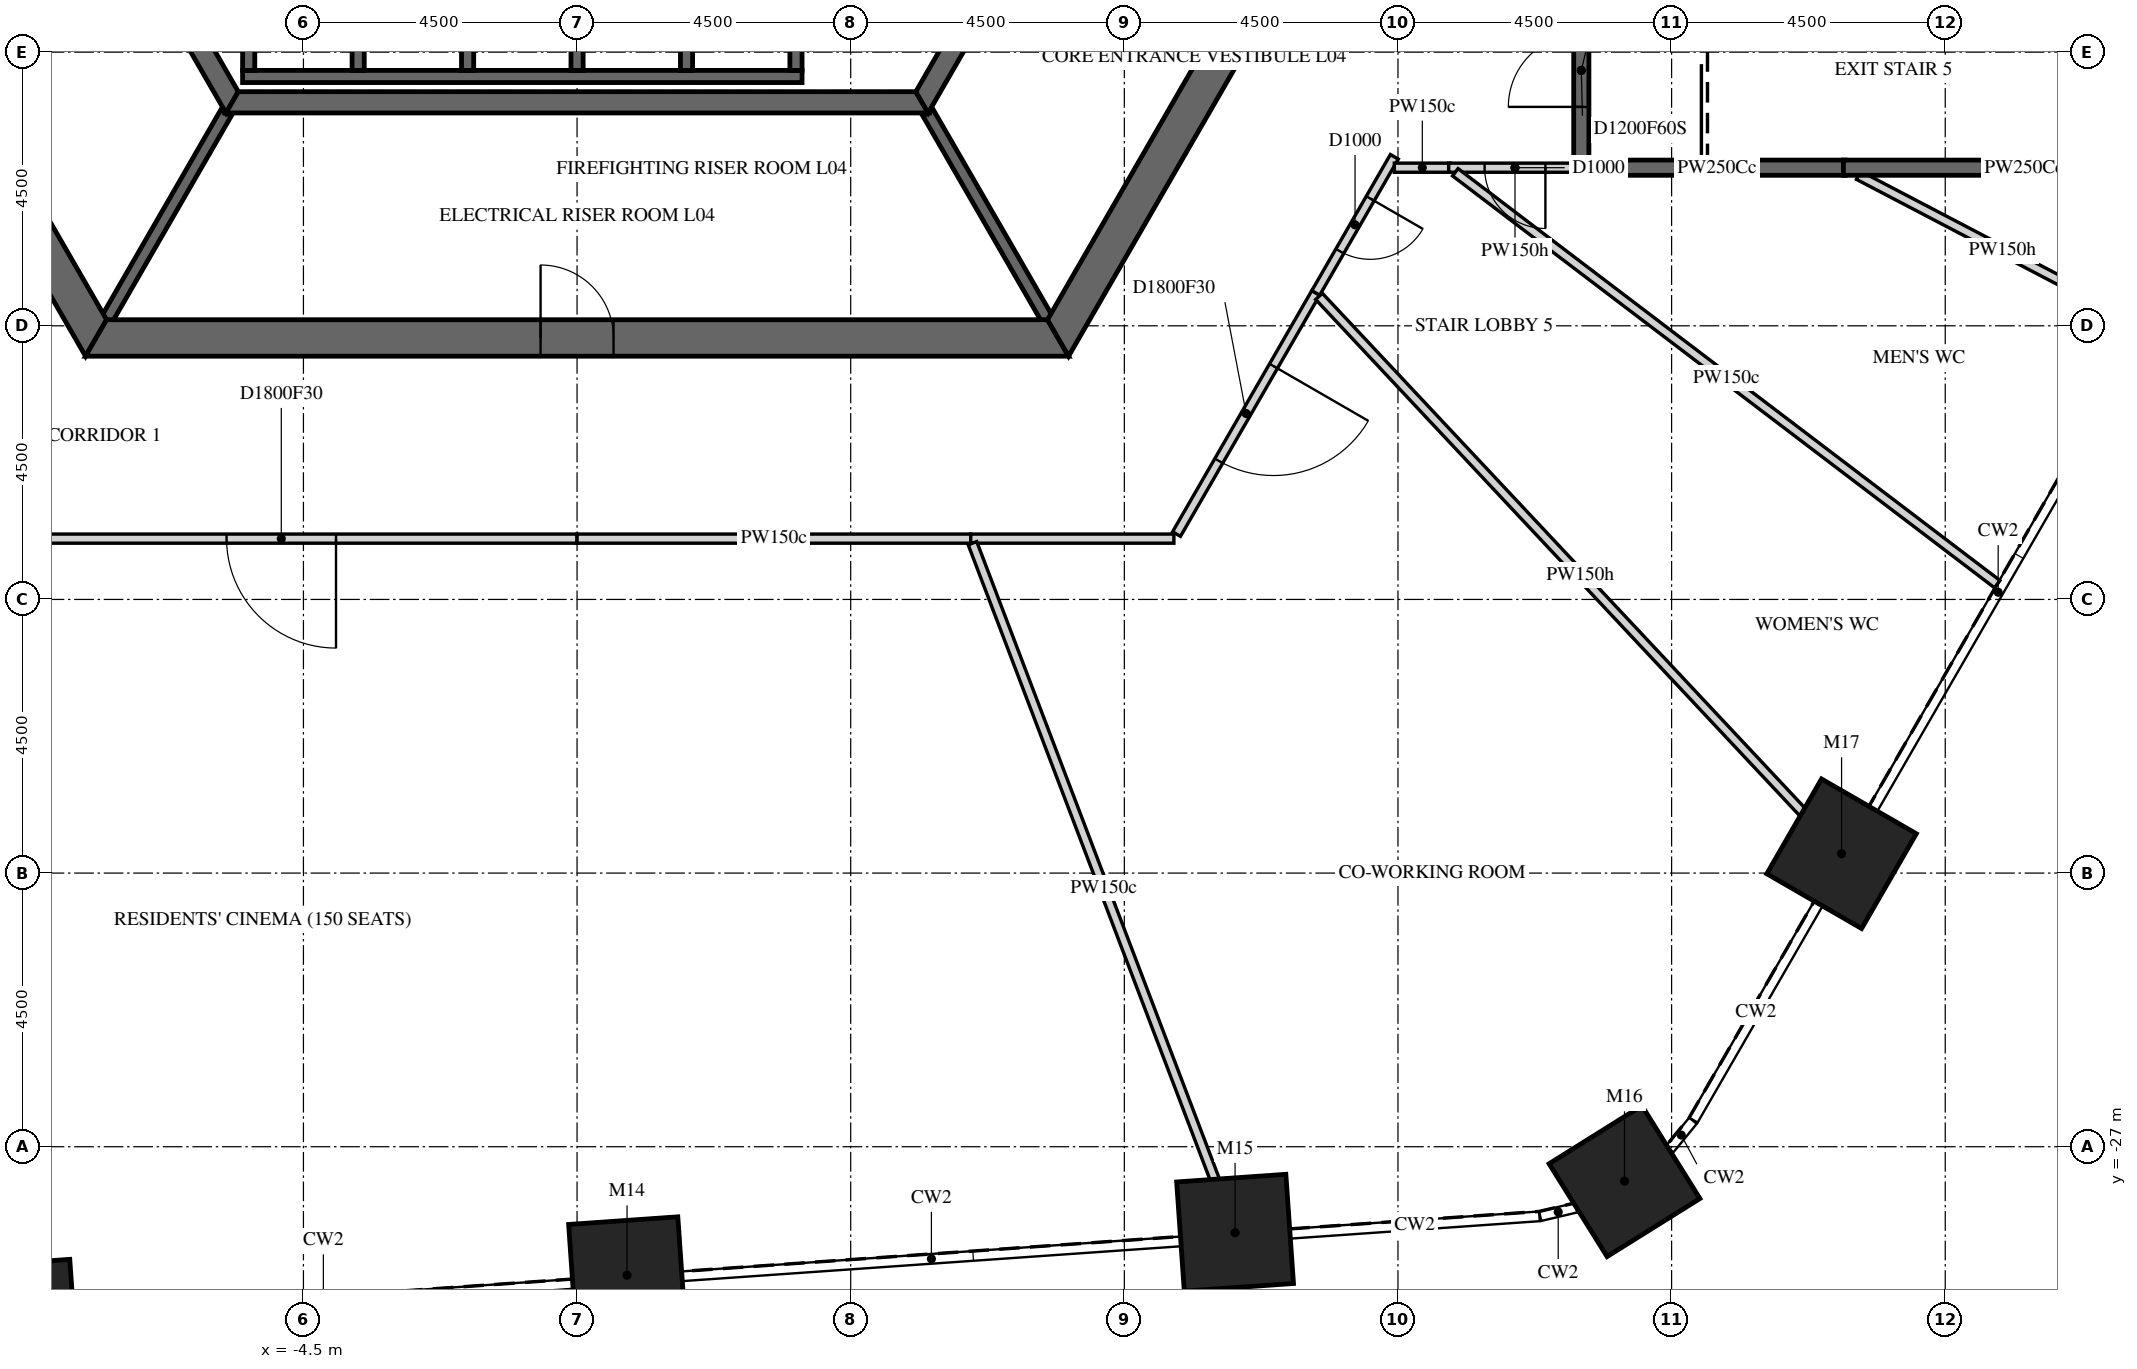
"""IFC4 building model, lengths in metres.
Left out: names, types, materials, properties, quantities, classifications, styles, units other than length and angle.
Written with IfcOpenShell. Run it as: python <this file> out.ifc"""

import sys

from ifc_helpers import new_model, si_unit, direction, frame, frame_2d, origin, origin_2d, place, context, subcontext, project, spatial, polyline, rectangle, outline, extrude, element, fill, save


model = new_model("IFC4")
c1 = context("Model", 3, precision=1e-05, world=origin(), true_north=direction((0.0, 1.0)))
c2 = subcontext(c1, "Body", "Model", "MODEL_VIEW")
j1 = project(units=[si_unit("LENGTHUNIT", "METRE"), si_unit("PLANEANGLEUNIT", "RADIAN")], contexts=[c1])
p1 = place(None, origin())
s1 = spatial("IfcSite", under=j1, at=p1, CompositionType="ELEMENT")
p2 = place(p1, origin())
s2 = spatial("IfcBuilding", under=s1, at=p2, CompositionType="ELEMENT")
p3 = place(p2, frame((0.0, 0.0, 26.0)))
s3 = spatial("IfcBuildingStorey", under=s2, at=p3, CompositionType="ELEMENT", Elevation=26.0)
for number, where, z_axis, x_axis in (
    (1, (-9.177, -29.813, -0.25), (0.0, 0.0, 1.0), (-0.998, -0.07, 0.0)),
    (2, (0.822, -29.114, -0.25), (0.0, 0.0, 1.0), (-0.998, -0.07, 0.0)),
    (3, (10.821, -28.414, -0.25), (0.0, 0.0, 1.0), (-0.998, -0.07, 0.0)),
    (4, (17.225, -27.566, -0.25), (0.0, 0.0, 1.0), (-0.848, -0.53, 0.0)),
    (5, (20.795, -22.182, -0.25), (0.0, 0.0, 1.0), (-0.5, -0.866, 0.0)),
):
    element("IfcColumn", number, at=place(p3, frame(where, z_axis=z_axis, x_axis=x_axis)), inside=s3, PredefinedType="COLUMN", context=c2, shape_type="SweptSolid", body=[
        extrude(rectangle(XDim=1.8, YDim=1.8, at=origin_2d()), origin(), (0.0, 0.0, 1.0), 5.45),
    ])
p4 = place(p3, frame((-15.819, 0.0, -0.25), z_axis=(0.0, 0.0, 1.0), x_axis=(0.499999880136, -0.866025472988, 0.0)))
e6 = element("IfcWall", 6, at=p4, inside=s3, PredefinedType="SHEAR", context=c2, shape_type="SweptSolid", body=[
    extrude(outline(polyline([(-0.173, -0.3), (15.993, -0.3), (15.646, 0.3), (0.173, 0.3), (-0.173, -0.3)])), origin(), (0.0, 0.0, 1.0), 5.45),
])
p5 = place(p4, frame((6.981, 0.0, 0.25)))
e7 = element("IfcOpeningElement", 7, at=p5, cuts=e6, PredefinedType="OPENING", context=c2, shape_type="SweptSolid", body=[
    extrude(rectangle(XDim=1.8, YDim=2.4, at=frame_2d((0.9, 1.2))), frame((0.0, 0.31, 0.0), z_axis=(0.0, -1.0, 0.0), x_axis=(1.0, 0.0, 0.0)), (0.0, 0.0, 1.0), 0.62),
])
p6 = place(p3, frame((-7.91, -13.7, -0.25), z_axis=(0.0, 0.0, 1.0), x_axis=(1.0, 0.0, 0.0)))
e8 = element("IfcWall", 8, at=p6, inside=s3, PredefinedType="SHEAR", context=c2, shape_type="SweptSolid", body=[
    extrude(outline(polyline([(-0.173, -0.3), (15.993, -0.3), (15.646, 0.3), (0.173, 0.3), (-0.173, -0.3)])), origin(), (0.0, 0.0, 1.0), 5.45),
])
p7 = place(p6, frame((7.31, 0.0, 0.25)))
e9 = element("IfcOpeningElement", 9, at=p7, cuts=e8, PredefinedType="OPENING", context=c2, shape_type="SweptSolid", body=[
    extrude(rectangle(XDim=1.2, YDim=2.4, at=frame_2d((0.6, 1.2))), frame((0.0, 0.31, 0.0), z_axis=(0.0, -1.0, 0.0), x_axis=(1.0, 0.0, 0.0)), (0.0, 0.0, 1.0), 0.62),
])
p8 = place(p3, frame((7.91, -13.7, -0.25), z_axis=(0.0, 0.0, 1.0), x_axis=(0.499999880136, 0.866025472988, 0.0)))
e10 = element("IfcWall", 10, at=p8, inside=s3, PredefinedType="SHEAR", context=c2, shape_type="SweptSolid", body=[
    extrude(outline(polyline([(-0.173, -0.3), (15.993, -0.3), (15.646, 0.3), (0.173, 0.3), (-0.173, -0.3)])), origin(), (0.0, 0.0, 1.0), 5.45),
])
p9 = place(p8, frame((7.039, 0.0, 0.25)))
e11 = element("IfcOpeningElement", 11, at=p9, cuts=e10, PredefinedType="OPENING", context=c2, shape_type="SweptSolid", body=[
    extrude(rectangle(XDim=1.8, YDim=2.4, at=frame_2d((0.9, 1.2))), frame((0.0, 0.31, 0.0), z_axis=(0.0, -1.0, 0.0), x_axis=(1.0, 0.0, 0.0)), (0.0, 0.0, 1.0), 0.62),
])
p10 = place(p3, frame((-11.345, 0.0, -0.25), z_axis=(0.0, 0.0, 1.0), x_axis=(0.499995046907, -0.866028263435, 0.0)))
e12 = element("IfcWall", 12, at=p10, inside=s3, PredefinedType="SHEAR", context=c2, shape_type="SweptSolid", body=[
    extrude(outline(polyline([(-0.101, -0.175), (11.446, -0.175), (11.244, 0.175), (0.101, 0.175), (-0.101, -0.175)])), origin(), (0.0, 0.0, 1.0), 5.45),
])
p11 = place(p10, frame((4.744, 0.0, 0.25)))
e13 = element("IfcOpeningElement", 13, at=p11, cuts=e12, PredefinedType="OPENING", context=c2, shape_type="SweptSolid", body=[
    extrude(rectangle(XDim=1.8, YDim=2.4, at=frame_2d((0.9, 1.2))), frame((0.0, 0.185, 0.0), z_axis=(0.0, -1.0, 0.0), x_axis=(1.0, 0.0, 0.0)), (0.0, 0.0, 1.0), 0.37),
])
p12 = place(p3, frame((-5.673, -9.825, -0.25), z_axis=(0.0, 0.0, 1.0), x_axis=(1.0, 0.0, 0.0)))
e14 = element("IfcWall", 14, at=p12, inside=s3, PredefinedType="SHEAR", context=c2, shape_type="SweptSolid", body=[
    extrude(outline(polyline([(-0.101, -0.175), (11.446, -0.175), (11.244, 0.175), (0.101, 0.175), (-0.101, -0.175)])), origin(), (0.0, 0.0, 1.0), 5.45),
])
p13 = place(p3, frame((5.673, -9.825, -0.25), z_axis=(0.0, 0.0, 1.0), x_axis=(0.499995046907, 0.866028263435, 0.0)))
e15 = element("IfcWall", 15, at=p13, inside=s3, PredefinedType="SHEAR", context=c2, shape_type="SweptSolid", body=[
    extrude(outline(polyline([(-0.101, -0.175), (11.446, -0.175), (11.244, 0.175), (0.101, 0.175), (-0.101, -0.175)])), origin(), (0.0, 0.0, 1.0), 5.45),
])
p14 = place(p13, frame((4.801, 0.0, 0.25)))
e16 = element("IfcOpeningElement", 16, at=p14, cuts=e15, PredefinedType="OPENING", context=c2, shape_type="SweptSolid", body=[
    extrude(rectangle(XDim=1.8, YDim=2.4, at=frame_2d((0.9, 1.2))), frame((0.0, 0.185, 0.0), z_axis=(0.0, -1.0, 0.0), x_axis=(1.0, 0.0, 0.0)), (0.0, 0.0, 1.0), 0.37),
])
p15 = place(p3, frame((-5.5, -9.4, -0.25), z_axis=(0.0, 0.0, 1.0), x_axis=(1.0, 0.0, 0.0)))
e17 = element("IfcWall", 17, at=p15, inside=s3, PredefinedType="SHEAR", context=c2, shape_type="SweptSolid", body=[
    extrude(rectangle(XDim=9.2, YDim=0.2, at=frame_2d((4.6, 0.0))), origin(), (0.0, 0.0, 1.0), 5.5),
])
for number, where, z_axis, x_axis in (
    (18, (-5.4, -9.3, -0.25), (0.0, 0.0, 1.0), (0.0, 1.0, 0.0)),
    (19, (-3.6, -9.3, -0.25), (0.0, 0.0, 1.0), (0.0, 1.0, 0.0)),
    (20, (-1.8, -9.3, -0.25), (0.0, 0.0, 1.0), (0.0, 1.0, 0.0)),
    (21, (0.0, -9.3, -0.25), (0.0, 0.0, 1.0), (0.0, 1.0, 0.0)),
    (22, (1.8, -9.3, -0.25), (0.0, 0.0, 1.0), (0.0, 1.0, 0.0)),
    (23, (3.6, -9.3, -0.25), (0.0, 0.0, 1.0), (0.0, 1.0, 0.0)),
):
    element("IfcWall", number, at=place(p3, frame(where, z_axis=z_axis, x_axis=x_axis)), inside=s3, PredefinedType="SHEAR", context=c2, shape_type="SweptSolid", body=[
        extrude(rectangle(XDim=2.9, YDim=0.2, at=frame_2d((1.45, 0.0))), origin(), (0.0, 0.0, 1.0), 5.5),
    ])
for number, where, z_axis, x_axis in (
    (24, (-5.773, -10.0, -0.25), (0.0, 0.0, 1.0), (-0.5, -0.866, 0.0)),
    (25, (5.773, -10.0, -0.25), (0.0, 0.0, 1.0), (0.5, -0.866, 0.0)),
):
    element("IfcWall", number, at=place(p3, frame(where, z_axis=z_axis, x_axis=x_axis)), inside=s3, PredefinedType="SHEAR", context=c2, shape_type="SweptSolid", body=[
        extrude(rectangle(XDim=3.926, YDim=0.2, at=frame_2d((1.963, 0.0))), origin(), (0.0, 0.0, 1.0), 5.45),
    ])
p16 = place(p3, frame((0.0, -17.0, 0.0), z_axis=(0.0, 0.0, 1.0), x_axis=(-1.0, 0.0, 0.0)))
e26 = element("IfcWall", 26, at=p16, inside=s3, PredefinedType="PARTITIONING", context=c2, shape_type="SweptSolid", body=[
    extrude(rectangle(XDim=9.729, YDim=0.15, at=frame_2d((4.864, 0.0))), origin(), (0.0, 0.0, 1.0), 5.2),
])
p17 = place(p16, frame((3.964, 0.0, 0.0)))
e27 = element("IfcOpeningElement", 27, at=p17, cuts=e26, PredefinedType="OPENING", context=c2, shape_type="SweptSolid", body=[
    extrude(rectangle(XDim=1.8, YDim=2.1, at=frame_2d((0.9, 1.05))), frame((0.0, 0.085, 0.0), z_axis=(0.0, -1.0, 0.0), x_axis=(1.0, 0.0, 0.0)), (0.0, 0.0, 1.0), 0.17),
])
p18 = place(p3, frame((0.0, -17.0, 0.0), z_axis=(0.0, 0.0, 1.0), x_axis=(1.0, 0.0, 0.0)))
e28 = element("IfcWall", 28, at=p18, inside=s3, PredefinedType="PARTITIONING", context=c2, shape_type="SweptSolid", body=[
    extrude(rectangle(XDim=6.474, YDim=0.15, at=frame_2d((3.237, 0.0))), origin(), (0.0, 0.0, 1.0), 5.2),
])
p19 = place(p3, frame((6.474, -17.0, 0.0), z_axis=(0.0, 0.0, 1.0), x_axis=(1.0, 0.0, 0.0)))
e29 = element("IfcWall", 29, at=p19, inside=s3, PredefinedType="PARTITIONING", context=c2, shape_type="SweptSolid", body=[
    extrude(rectangle(XDim=3.341, YDim=0.15, at=frame_2d((1.67, 0.0))), origin(), (0.0, 0.0, 1.0), 5.2),
])
p20 = place(p3, frame((12.148, -12.959, 0.0), z_axis=(0.0, 0.0, 1.0), x_axis=(-0.499957811549, -0.866049759928, 0.0)))
e30 = element("IfcWall", 30, at=p20, inside=s3, PredefinedType="PARTITIONING", context=c2, shape_type="SweptSolid", body=[
    extrude(rectangle(XDim=4.58, YDim=0.15, at=frame_2d((2.29, 0.0))), origin(), (0.0, 0.0, 1.0), 5.2),
])
p21 = place(p20, frame((1.39, 0.0, 0.0)))
e31 = element("IfcOpeningElement", 31, at=p21, cuts=e30, PredefinedType="OPENING", context=c2, shape_type="SweptSolid", body=[
    extrude(rectangle(XDim=1.8, YDim=2.1, at=frame_2d((0.9, 1.05))), frame((0.0, 0.085, 0.0), z_axis=(0.0, -1.0, 0.0), x_axis=(1.0, 0.0, 0.0)), (0.0, 0.0, 1.0), 0.17),
])
p22 = place(p3, frame((10.821, -28.414, 0.0), z_axis=(0.0, 0.0, 1.0), x_axis=(-0.355901613379, 0.934523430201, 0.0)))
e32 = element("IfcWall", 32, at=p22, inside=s3, PredefinedType="PARTITIONING", context=c2, shape_type="SweptSolid", body=[
    extrude(rectangle(XDim=12.134, YDim=0.15, at=frame_2d((6.067, 0.0))), origin(), (0.0, 0.0, 1.0), 5.2),
])
p23 = place(p3, frame((13.44, -10.721, 0.0), z_axis=(0.0, 0.0, 1.0), x_axis=(-0.499959617396, -0.866048717436, 0.0)))
e33 = element("IfcWall", 33, at=p23, inside=s3, PredefinedType="PARTITIONING", context=c2, shape_type="SweptSolid", body=[
    extrude(rectangle(XDim=2.584, YDim=0.15, at=frame_2d((1.292, 0.0))), origin(), (0.0, 0.0, 1.0), 5.2),
])
p24 = place(p23, frame((0.792, 0.0, 0.0)))
e34 = element("IfcOpeningElement", 34, at=p24, cuts=e33, PredefinedType="OPENING", context=c2, shape_type="SweptSolid", body=[
    extrude(rectangle(XDim=1.0, YDim=2.1, at=frame_2d((0.5, 1.05))), frame((0.0, 0.085, 0.0), z_axis=(0.0, -1.0, 0.0), x_axis=(1.0, 0.0, 0.0)), (0.0, 0.0, 1.0), 0.17),
])
p25 = place(p3, frame((14.36, -10.9, 0.0), z_axis=(0.0, 0.0, 1.0), x_axis=(-1.0, 0.0, 0.0)))
e35 = element("IfcWall", 35, at=p25, inside=s3, PredefinedType="PARTITIONING", context=c2, shape_type="SweptSolid", body=[
    extrude(rectangle(XDim=0.92, YDim=0.15, at=frame_2d((0.46, 0.0))), origin(), (0.0, 0.0, 1.0), 5.2),
])
p26 = place(p3, frame((16.515, -10.9, 0.0), z_axis=(0.0, 0.0, 1.0), x_axis=(-1.0, 0.0, 0.0)))
e36 = element("IfcWall", 36, at=p26, inside=s3, PredefinedType="PARTITIONING", context=c2, shape_type="SweptSolid", body=[
    extrude(rectangle(XDim=2.181, YDim=0.15, at=frame_2d((1.09, 0.0))), origin(), (0.0, 0.0, 1.0), 4.273),
])
p27 = place(p26, frame((0.591, 0.0, 0.0)))
e37 = element("IfcOpeningElement", 37, at=p27, cuts=e36, PredefinedType="OPENING", context=c2, shape_type="SweptSolid", body=[
    extrude(rectangle(XDim=1.0, YDim=2.1, at=frame_2d((0.5, 1.05))), frame((0.0, 0.085, 0.0), z_axis=(0.0, -1.0, 0.0), x_axis=(1.0, 0.0, 0.0)), (0.0, 0.0, 1.0), 0.17),
])
p28 = place(p3, frame((16.515, -10.825, 0.0), z_axis=(0.0, 0.0, 1.0), x_axis=(0.0, 1.0, 0.0)))
e38 = element("IfcWall", 38, at=p28, inside=s3, PredefinedType="PARTITIONING", context=c2, shape_type="SweptSolid", body=[
    extrude(rectangle(XDim=3.05, YDim=0.25, at=frame_2d((1.525, 0.0))), origin(), (0.0, 0.0, 1.0), 5.2),
])
p29 = place(p28, frame((0.925, 0.0, 0.0)))
e39 = element("IfcOpeningElement", 39, at=p29, cuts=e38, PredefinedType="OPENING", context=c2, shape_type="SweptSolid", body=[
    extrude(rectangle(XDim=1.2, YDim=2.1, at=frame_2d((0.6, 1.05))), frame((0.0, 0.135, 0.0), z_axis=(0.0, -1.0, 0.0), x_axis=(1.0, 0.0, 0.0)), (0.0, 0.0, 1.0), 0.27),
])
p30 = place(p3, frame((20.795, -22.182, 0.0), z_axis=(0.0, 0.0, 1.0), x_axis=(-0.683955995382, 0.729523266511, 0.0)))
e40 = element("IfcWall", 40, at=p30, inside=s3, PredefinedType="PARTITIONING", context=c2, shape_type="SweptSolid", body=[
    extrude(rectangle(XDim=12.564, YDim=0.15, at=frame_2d((6.282, 0.0))), origin(), (0.0, 0.0, 1.0), 4.273),
])
p31 = place(p3, frame((20.856, -10.9, 0.0), z_axis=(0.0, 0.0, 1.0), x_axis=(-1.0, 0.0, 0.0)))
e41 = element("IfcWall", 41, at=p31, inside=s3, PredefinedType="PARTITIONING", context=c2, shape_type="SweptSolid", body=[
    extrude(rectangle(XDim=4.216, YDim=0.25, at=frame_2d((2.108, 0.0))), origin(), (0.0, 0.0, 1.0), 5.2),
])
p32 = place(p3, frame((23.355, -17.748, 0.0), z_axis=(0.0, 0.0, 1.0), x_axis=(-0.796181106224, 0.605058382383, 0.0)))
e42 = element("IfcWall", 42, at=p32, inside=s3, PredefinedType="PARTITIONING", context=c2, shape_type="SweptSolid", body=[
    extrude(rectangle(XDim=11.194, YDim=0.15, at=frame_2d((5.597, 0.0))), origin(), (0.0, 0.0, 1.0), 5.2),
])
p33 = place(p3, frame((25.807, -13.501, 0.0), z_axis=(0.0, 0.0, 1.0), x_axis=(-0.886067598261, 0.463556049807, 0.0)))
e43 = element("IfcWall", 43, at=p33, inside=s3, PredefinedType="PARTITIONING", context=c2, shape_type="SweptSolid", body=[
    extrude(rectangle(XDim=5.342, YDim=0.15, at=frame_2d((2.671, 0.0))), origin(), (0.0, 0.0, 1.0), 4.273),
])
p34 = place(p3, frame((26.785, -10.9, 0.0), z_axis=(0.0, 0.0, 1.0), x_axis=(-1.0, 0.0, 0.0)))
e44 = element("IfcWall", 44, at=p34, inside=s3, PredefinedType="PARTITIONING", context=c2, shape_type="SweptSolid", body=[
    extrude(rectangle(XDim=5.96, YDim=0.25, at=frame_2d((2.98, 0.0))), origin(), (0.0, 0.0, 1.0), 4.273),
])
p35 = place(p7, origin())
e45 = element("IfcDoor", 45, at=p35, inside=s3, OperationType="SINGLE_SWING_LEFT", PredefinedType="DOOR", context=c2, shape_type="SweptSolid", body=[
    extrude(rectangle(XDim=1.2, YDim=2.4, at=frame_2d((0.6, 1.2))), frame((0.0, 0.025, 0.0), z_axis=(0.0, -1.0, 0.0), x_axis=(1.0, 0.0, 0.0)), (0.0, 0.0, 1.0), 0.05),
])
fill(e9, e45)
p36 = place(p17, origin())
e46 = element("IfcDoor", 46, at=p36, inside=s3, OperationType="DOUBLE_DOOR_SINGLE_SWING", PredefinedType="DOOR", context=c2, shape_type="SweptSolid", body=[
    extrude(rectangle(XDim=1.8, YDim=2.1, at=frame_2d((0.9, 1.05))), frame((0.0, 0.025, 0.0), z_axis=(0.0, -1.0, 0.0), x_axis=(1.0, 0.0, 0.0)), (0.0, 0.0, 1.0), 0.05),
])
fill(e27, e46)
p37 = place(p21, origin())
e47 = element("IfcDoor", 47, at=p37, inside=s3, OperationType="DOUBLE_DOOR_SINGLE_SWING", PredefinedType="DOOR", context=c2, shape_type="SweptSolid", body=[
    extrude(rectangle(XDim=1.8, YDim=2.1, at=frame_2d((0.9, 1.05))), frame((0.0, 0.025, 0.0), z_axis=(0.0, -1.0, 0.0), x_axis=(1.0, 0.0, 0.0)), (0.0, 0.0, 1.0), 0.05),
])
fill(e31, e47)
p38 = place(p24, origin())
e48 = element("IfcDoor", 48, at=p38, inside=s3, OperationType="SINGLE_SWING_LEFT", PredefinedType="DOOR", context=c2, shape_type="SweptSolid", body=[
    extrude(rectangle(XDim=1.0, YDim=2.1, at=frame_2d((0.5, 1.05))), frame((0.0, 0.025, 0.0), z_axis=(0.0, -1.0, 0.0), x_axis=(1.0, 0.0, 0.0)), (0.0, 0.0, 1.0), 0.05),
])
fill(e34, e48)
p39 = place(p27, origin())
e49 = element("IfcDoor", 49, at=p39, inside=s3, OperationType="SINGLE_SWING_RIGHT", PredefinedType="DOOR", context=c2, shape_type="SweptSolid", body=[
    extrude(rectangle(XDim=1.0, YDim=2.1, at=frame_2d((0.5, 1.05))), frame((0.0, 0.025, 0.0), z_axis=(0.0, -1.0, 0.0), x_axis=(1.0, 0.0, 0.0)), (0.0, 0.0, 1.0), 0.05),
])
fill(e37, e49)
p40 = place(p29, origin())
e50 = element("IfcDoor", 50, at=p40, inside=s3, OperationType="SINGLE_SWING_LEFT", PredefinedType="DOOR", context=c2, shape_type="SweptSolid", body=[
    extrude(rectangle(XDim=1.2, YDim=2.1, at=frame_2d((0.6, 1.05))), frame((0.0, 0.025, 0.0), z_axis=(0.0, -1.0, 0.0), x_axis=(1.0, 0.0, 0.0)), (0.0, 0.0, 1.0), 0.05),
])
fill(e39, e50)
save(model, sys.argv[1])
